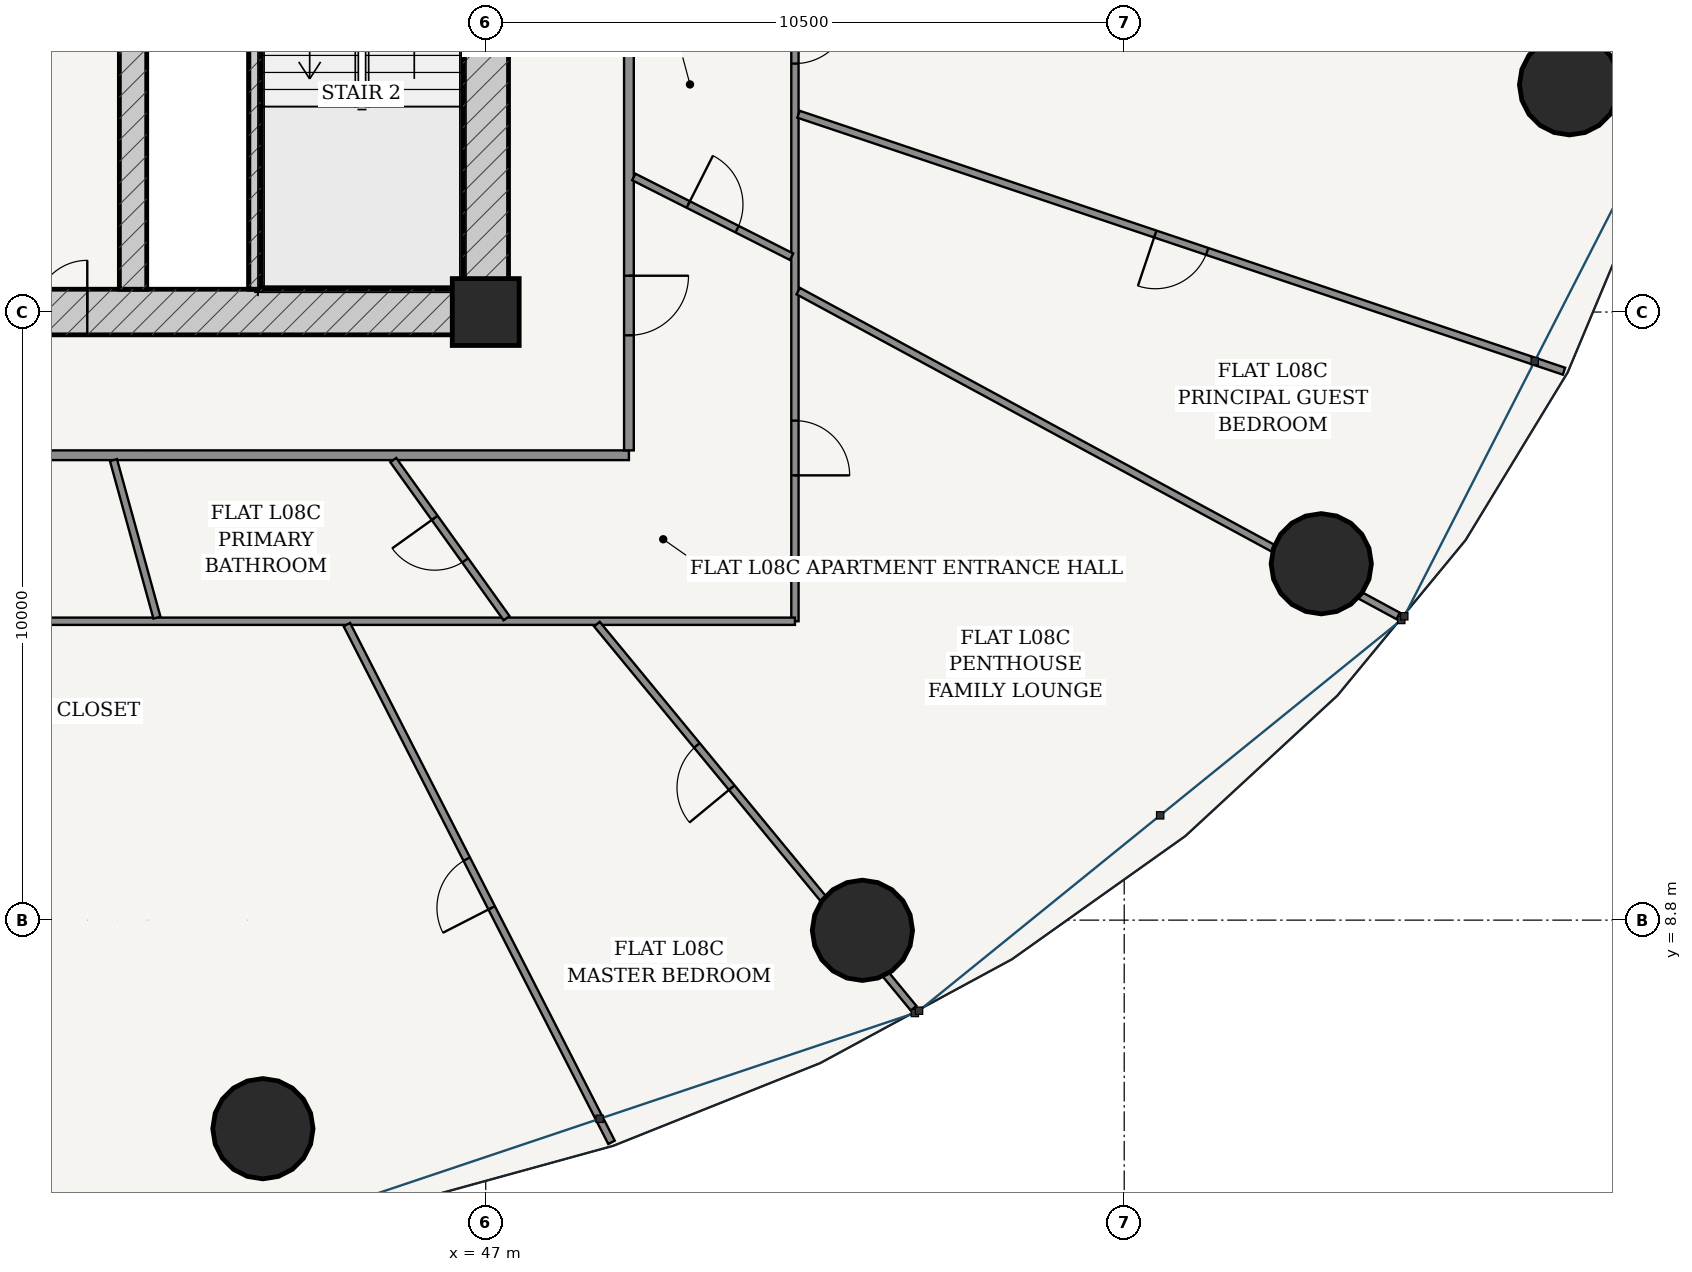
"""IFC4 building model, lengths in metres.
Left out: names, types, materials, properties, quantities, classifications, styles, units other than length and angle.
Written with IfcOpenShell. Run it as: python <this file> out.ifc"""

import sys

from ifc_helpers import new_model, si_unit, direction, frame, frame_2d, origin, origin_2d, place, context, subcontext, project, spatial, rectangle, hollow_circle, extrude, source, transform, mapped, element, fill, save


model = new_model("IFC4")
c1 = context("Model", 3, precision=1e-05, world=origin(), true_north=direction((-0.2419218956, 0.970295726276)))
c2 = subcontext(c1, "Body", "Model", "MODEL_VIEW")
j1 = project(units=[si_unit("LENGTHUNIT", "METRE"), si_unit("PLANEANGLEUNIT", "RADIAN")], contexts=[c1])
p1 = place(None, origin())
s1 = spatial("IfcSite", under=j1, at=p1, CompositionType="ELEMENT")
p2 = place(p1, origin())
s2 = spatial("IfcBuilding", under=s1, at=p2, CompositionType="ELEMENT")
p3 = place(p2, frame((0.0, 0.0, 34.8)))
s3 = spatial("IfcBuildingStorey", under=s2, at=p3, CompositionType="ELEMENT", Elevation=34.8)
p4 = place(p3, frame((47.0, 18.8, 0.0), z_axis=(0.0, 0.0, 1.0), x_axis=(1.0, 0.0, 0.0)))
e1 = element("IfcColumn", 1, at=p4, inside=s3, PredefinedType="COLUMN", context=c2, shape_type="SweptSolid", body=[
    extrude(rectangle(XDim=1.1, YDim=1.1, at=origin_2d()), origin(), (0.0, 0.0, 1.0), 3.6),
])
p5 = place(p3, frame((28.625, 18.8, 0.0), z_axis=(0.0, 0.0, 1.0), x_axis=(1.0, 0.0, 0.0)))
e2 = element("IfcWall", 2, at=p5, inside=s3, PredefinedType="SHEAR", context=c2, shape_type="SweptSolid", body=[
    extrude(rectangle(XDim=18.75, YDim=0.75, at=frame_2d((9.375, 0.0))), origin(), (0.0, 0.0, 1.0), 3.32),
])
p6 = place(p5, frame((6.927, 0.0, 0.0)))
e3 = element("IfcOpeningElement", 3, at=p6, cuts=e2, PredefinedType="OPENING", context=c2, shape_type="SweptSolid", body=[
    extrude(rectangle(XDim=0.85, YDim=2.1, at=frame_2d((0.425, 1.05))), frame((0.0, 0.385, 0.0), z_axis=(0.0, -1.0, 0.0), x_axis=(1.0, 0.0, 0.0)), (0.0, 0.0, 1.0), 0.77),
])
p7 = place(p5, frame((8.95, 0.0, 0.0)))
e4 = element("IfcOpeningElement", 4, at=p7, cuts=e2, PredefinedType="OPENING", context=c2, shape_type="SweptSolid", body=[
    extrude(rectangle(XDim=0.85, YDim=2.1, at=frame_2d((0.425, 1.05))), frame((0.0, 0.385, 0.0), z_axis=(0.0, -1.0, 0.0), x_axis=(1.0, 0.0, 0.0)), (0.0, 0.0, 1.0), 0.77),
])
p8 = place(p5, frame((10.972, 0.0, 0.0)))
e5 = element("IfcOpeningElement", 5, at=p8, cuts=e2, PredefinedType="OPENING", context=c2, shape_type="SweptSolid", body=[
    extrude(rectangle(XDim=0.85, YDim=2.1, at=frame_2d((0.425, 1.05))), frame((0.0, 0.385, 0.0), z_axis=(0.0, -1.0, 0.0), x_axis=(1.0, 0.0, 0.0)), (0.0, 0.0, 1.0), 0.77),
])
p9 = place(p3, frame((47.0, 19.175, 0.0), z_axis=(0.0, 0.0, 1.0), x_axis=(0.0, 1.0, 0.0)))
e6 = element("IfcWall", 6, at=p9, inside=s3, PredefinedType="SHEAR", context=c2, shape_type="SweptSolid", body=[
    extrude(rectangle(XDim=15.25, YDim=0.75, at=frame_2d((7.625, 0.0))), origin(), (0.0, 0.0, 1.0), 3.32),
])
p10 = place(p9, frame((9.875, 0.0, 0.0)))
e7 = element("IfcOpeningElement", 7, at=p10, cuts=e6, PredefinedType="OPENING", context=c2, shape_type="SweptSolid", body=[
    extrude(rectangle(XDim=1.5, YDim=2.2, at=frame_2d((0.75, 1.1))), frame((0.0, 0.385, 0.0), z_axis=(0.0, -1.0, 0.0), x_axis=(1.0, 0.0, 0.0)), (0.0, 0.0, 1.0), 0.77),
])
p11 = place(p3, frame((43.205, 19.175, 0.0), z_axis=(0.0, 0.0, 1.0), x_axis=(0.0, 1.0, 0.0)))
e8 = element("IfcWall", 8, at=p11, inside=s3, PredefinedType="SOLIDWALL", context=c2, shape_type="SweptSolid", body=[
    extrude(rectangle(XDim=7.375, YDim=0.2, at=frame_2d((3.688, 0.0))), origin(), (0.0, 0.0, 1.0), 3.32),
])
p12 = place(p3, frame((41.2, 19.175, 0.0), z_axis=(0.0, 0.0, 1.0), x_axis=(0.0, 1.0, 0.0)))
e9 = element("IfcWall", 9, at=p12, inside=s3, PredefinedType="SHEAR", context=c2, shape_type="SweptSolid", body=[
    extrude(rectangle(XDim=15.25, YDim=0.45, at=frame_2d((7.625, 0.0))), origin(), (0.0, 0.0, 1.0), 3.32),
])
p13 = place(p12, frame((7.8, 0.0, 0.0)))
e10 = element("IfcOpeningElement", 10, at=p13, cuts=e9, PredefinedType="OPENING", context=c2, shape_type="SweptSolid", body=[
    extrude(rectangle(XDim=1.05, YDim=2.15, at=frame_2d((0.525, 1.075))), frame((0.0, 0.235, 0.0), z_axis=(0.0, -1.0, 0.0), x_axis=(1.0, 0.0, 0.0)), (0.0, 0.0, 1.0), 0.47),
])
for number, where, z_axis, x_axis in (
    (11, (43.336, 5.37, 0.0), (0.0, 0.0, 1.0), (1.0, 0.0, 0.0)),
    (12, (53.195, 8.632, 0.0), (0.0, 0.0, 1.0), (1.0, 0.0, 0.0)),
    (13, (60.741, 14.661, 0.0), (0.0, 0.0, 1.0), (1.0, 0.0, 0.0)),
    (14, (64.824, 22.537, 0.0), (0.0, 0.0, 1.0), (1.0, 0.0, 0.0)),
):
    element("IfcColumn", number, at=place(p3, frame(where, z_axis=z_axis, x_axis=x_axis)), inside=s3, PredefinedType="COLUMN", context=c2, shape_type="SweptSolid", body=[
        extrude(hollow_circle(Radius=0.825, WallThickness=0.05, at=origin_2d()), origin(), (0.0, 0.0, 1.0), 3.6),
    ])
p14 = place(p3, frame((26.645, 16.445, 0.0), z_axis=(0.0, 0.0, 1.0), x_axis=(1.0, 0.0, 0.0)))
e15 = element("IfcWall", 15, at=p14, inside=s3, PredefinedType="PARTITIONING", context=c2, shape_type="SweptSolid", body=[
    extrude(rectangle(XDim=22.71, YDim=0.16, at=frame_2d((11.355, 0.0))), origin(), (0.0, 0.0, 1.0), 2.688),
])
p15 = place(p3, frame((49.355, 16.525, 0.0), z_axis=(0.0, 0.0, 1.0), x_axis=(0.0, 1.0, 0.0)))
e16 = element("IfcWall", 16, at=p15, inside=s3, PredefinedType="PARTITIONING", context=c2, shape_type="SweptSolid", body=[
    extrude(rectangle(XDim=20.55, YDim=0.16, at=frame_2d((10.275, 0.0))), origin(), (0.0, 0.0, 1.0), 2.688),
])
p16 = place(p15, frame((17.207, 0.0, 0.0)))
e17 = element("IfcOpeningElement", 17, at=p16, cuts=e16, PredefinedType="OPENING", context=c2, shape_type="SweptSolid", body=[
    extrude(rectangle(XDim=0.98, YDim=2.2, at=frame_2d((0.49, 1.1))), frame((0.0, 0.09, 0.0), z_axis=(0.0, -1.0, 0.0), x_axis=(1.0, 0.0, 0.0)), (0.0, 0.0, 1.0), 0.18),
])
p17 = place(p15, frame((1.892, 0.0, 0.0)))
e18 = element("IfcOpeningElement", 18, at=p17, cuts=e16, PredefinedType="OPENING", context=c2, shape_type="SweptSolid", body=[
    extrude(rectangle(XDim=0.98, YDim=2.2, at=frame_2d((0.49, 1.1))), frame((0.0, 0.09, 0.0), z_axis=(0.0, -1.0, 0.0), x_axis=(1.0, 0.0, 0.0)), (0.0, 0.0, 1.0), 0.18),
])
p18 = place(p3, frame((52.085, 28.968, 0.0), z_axis=(0.0, 0.0, 1.0), x_axis=(0.0, -1.0, 0.0)))
e19 = element("IfcWall", 19, at=p18, inside=s3, PredefinedType="PARTITIONING", context=c2, shape_type="SweptSolid", body=[
    extrude(rectangle(XDim=15.253, YDim=0.12, at=frame_2d((7.626, 0.0))), origin(), (0.0, 0.0, 1.0), 2.688),
])
p19 = place(p18, frame((11.954, 0.0, 0.0)))
e20 = element("IfcOpeningElement", 20, at=p19, cuts=e19, PredefinedType="OPENING", context=c2, shape_type="SweptSolid", body=[
    extrude(rectangle(XDim=0.9, YDim=2.15, at=frame_2d((0.45, 1.075))), frame((0.0, 0.07, 0.0), z_axis=(0.0, -1.0, 0.0), x_axis=(1.0, 0.0, 0.0)), (0.0, 0.0, 1.0), 0.14),
])
p20 = place(p18, frame((5.182, 0.0, 0.0)))
e21 = element("IfcOpeningElement", 21, at=p20, cuts=e19, PredefinedType="OPENING", context=c2, shape_type="SweptSolid", body=[
    extrude(rectangle(XDim=0.9, YDim=2.15, at=frame_2d((0.45, 1.075))), frame((0.0, 0.07, 0.0), z_axis=(0.0, -1.0, 0.0), x_axis=(1.0, 0.0, 0.0)), (0.0, 0.0, 1.0), 0.14),
])
p21 = place(p18, frame((1.889, 0.0, 0.0)))
e22 = element("IfcOpeningElement", 22, at=p21, cuts=e19, PredefinedType="OPENING", context=c2, shape_type="SweptSolid", body=[
    extrude(rectangle(XDim=0.9, YDim=2.15, at=frame_2d((0.45, 1.075))), frame((0.0, 0.07, 0.0), z_axis=(0.0, -1.0, 0.0), x_axis=(1.0, 0.0, 0.0)), (0.0, 0.0, 1.0), 0.14),
])
p22 = place(p3, frame((52.085, 13.715, 0.0), z_axis=(0.0, 0.0, 1.0), x_axis=(-1.0, 0.0, 0.0)))
e23 = element("IfcWall", 23, at=p22, inside=s3, PredefinedType="PARTITIONING", context=c2, shape_type="SweptSolid", body=[
    extrude(rectangle(XDim=24.772, YDim=0.12, at=frame_2d((12.386, 0.0))), origin(), (0.0, 0.0, 1.0), 2.688),
])
p23 = place(p22, frame((20.912, 0.0, 0.0)))
e24 = element("IfcOpeningElement", 24, at=p23, cuts=e23, PredefinedType="OPENING", context=c2, shape_type="SweptSolid", body=[
    extrude(rectangle(XDim=0.86, YDim=2.15, at=frame_2d((0.43, 1.075))), frame((0.0, 0.07, 0.0), z_axis=(0.0, -1.0, 0.0), x_axis=(1.0, 0.0, 0.0)), (0.0, 0.0, 1.0), 0.14),
])
p24 = place(p22, frame((13.87, 0.0, 0.0)))
e25 = element("IfcOpeningElement", 25, at=p24, cuts=e23, PredefinedType="OPENING", context=c2, shape_type="SweptSolid", body=[
    extrude(rectangle(XDim=0.9, YDim=2.15, at=frame_2d((0.45, 1.075))), frame((0.0, 0.07, 0.0), z_axis=(0.0, -1.0, 0.0), x_axis=(1.0, 0.0, 0.0)), (0.0, 0.0, 1.0), 0.14),
])
p25 = place(p3, frame((44.717, 13.66, 0.0), z_axis=(0.0, 0.0, 1.0), x_axis=(0.455131303234, -0.890424335256, 0.0)))
e26 = element("IfcWall", 26, at=p25, inside=s3, PredefinedType="PARTITIONING", context=c2, shape_type="SweptSolid", body=[
    extrude(rectangle(XDim=9.562, YDim=0.12, at=frame_2d((4.781, 0.0))), origin(), (0.0, 0.0, 1.0), 2.762),
])
p26 = place(p25, frame((4.331, 0.0, 0.0)))
e27 = element("IfcOpeningElement", 27, at=p26, cuts=e26, PredefinedType="OPENING", context=c2, shape_type="SweptSolid", body=[
    extrude(rectangle(XDim=0.9, YDim=2.15, at=frame_2d((0.45, 1.075))), frame((0.0, 0.07, 0.0), z_axis=(0.0, -1.0, 0.0), x_axis=(1.0, 0.0, 0.0)), (0.0, 0.0, 1.0), 0.14),
])
p27 = place(p3, frame((48.829, 13.667, 0.0), z_axis=(0.0, 0.0, 1.0), x_axis=(0.636177533893, -0.771542704826, 0.0)))
e28 = element("IfcWall", 28, at=p27, inside=s3, PredefinedType="PARTITIONING", context=c2, shape_type="SweptSolid", body=[
    extrude(rectangle(XDim=8.187, YDim=0.12, at=frame_2d((4.093, 0.0))), origin(), (0.0, 0.0, 1.0), 2.688),
])
p28 = place(p27, frame((2.584, 0.0, 0.0)))
e29 = element("IfcOpeningElement", 29, at=p28, cuts=e28, PredefinedType="OPENING", context=c2, shape_type="SweptSolid", body=[
    extrude(rectangle(XDim=0.9, YDim=2.15, at=frame_2d((0.45, 1.075))), frame((0.0, 0.07, 0.0), z_axis=(0.0, -1.0, 0.0), x_axis=(1.0, 0.0, 0.0)), (0.0, 0.0, 1.0), 0.14),
])
p29 = place(p3, frame((52.139, 19.144, 0.0), z_axis=(0.0, 0.0, 1.0), x_axis=(0.879372452045, -0.476134529922, 0.0)))
e30 = element("IfcWall", 30, at=p29, inside=s3, PredefinedType="PARTITIONING", context=c2, shape_type="SweptSolid", body=[
    extrude(rectangle(XDim=11.219, YDim=0.12, at=frame_2d((5.61, 0.0))), origin(), (0.0, 0.0, 1.0), 2.688),
])
p30 = place(p3, frame((52.144, 22.052, 0.0), z_axis=(0.0, 0.0, 1.0), x_axis=(0.948023034133, -0.318201707653, 0.0)))
e31 = element("IfcWall", 31, at=p30, inside=s3, PredefinedType="PARTITIONING", context=c2, shape_type="SweptSolid", body=[
    extrude(rectangle(XDim=13.279, YDim=0.12, at=frame_2d((6.639, 0.0))), origin(), (0.0, 0.0, 1.0), 2.762),
])
p31 = place(p30, frame((6.189, 0.0, 0.0)))
e32 = element("IfcOpeningElement", 32, at=p31, cuts=e31, PredefinedType="OPENING", context=c2, shape_type="SweptSolid", body=[
    extrude(rectangle(XDim=0.9, YDim=2.15, at=frame_2d((0.45, 1.075))), frame((0.0, 0.07, 0.0), z_axis=(0.0, -1.0, 0.0), x_axis=(1.0, 0.0, 0.0)), (0.0, 0.0, 1.0), 0.14),
])
p32 = place(p3, frame((40.878, 16.365, 0.0), z_axis=(0.0, 0.0, 1.0), x_axis=(0.265853298244, -0.964013497734, 0.0)))
e33 = element("IfcWall", 33, at=p32, inside=s3, PredefinedType="PARTITIONING", context=c2, shape_type="SweptSolid", body=[
    extrude(rectangle(XDim=2.687, YDim=0.12, at=frame_2d((1.344, 0.0))), origin(), (0.0, 0.0, 1.0), 3.32),
])
p33 = place(p3, frame((45.48, 16.365, 0.0), z_axis=(0.0, 0.0, 1.0), x_axis=(0.582566008831, -0.812783393872, 0.0)))
e34 = element("IfcWall", 34, at=p33, inside=s3, PredefinedType="PARTITIONING", context=c2, shape_type="SweptSolid", body=[
    extrude(rectangle(XDim=3.198, YDim=0.12, at=frame_2d((1.599, 0.0))), origin(), (0.0, 0.0, 1.0), 3.32),
])
p34 = place(p33, frame((1.169, 0.0, 0.0)))
e35 = element("IfcOpeningElement", 35, at=p34, cuts=e34, PredefinedType="OPENING", context=c2, shape_type="SweptSolid", body=[
    extrude(rectangle(XDim=0.86, YDim=2.15, at=frame_2d((0.43, 1.075))), frame((0.0, 0.07, 0.0), z_axis=(0.0, -1.0, 0.0), x_axis=(1.0, 0.0, 0.0)), (0.0, 0.0, 1.0), 0.14),
])
p35 = place(p3, frame((49.435, 21.021, 0.0), z_axis=(0.0, 0.0, 1.0), x_axis=(0.892504324967, -0.451038834155, 0.0)))
e36 = element("IfcWall", 36, at=p35, inside=s3, PredefinedType="PARTITIONING", context=c2, shape_type="SweptSolid", body=[
    extrude(rectangle(XDim=2.907, YDim=0.12, at=frame_2d((1.454, 0.0))), origin(), (0.0, 0.0, 1.0), 3.32),
])
p36 = place(p35, frame((1.004, 0.0, 0.0)))
e37 = element("IfcOpeningElement", 37, at=p36, cuts=e36, PredefinedType="OPENING", context=c2, shape_type="SweptSolid", body=[
    extrude(rectangle(XDim=0.9, YDim=2.15, at=frame_2d((0.45, 1.075))), frame((0.0, 0.07, 0.0), z_axis=(0.0, -1.0, 0.0), x_axis=(1.0, 0.0, 0.0)), (0.0, 0.0, 1.0), 0.14),
])
m1 = source(origin(), c2, "Body", "SweptSolid", [
    extrude(rectangle(XDim=0.85, YDim=2.1, at=frame_2d((0.425, 1.05))), frame((0.0, 0.025, 0.0), z_axis=(0.0, -1.0, 0.0), x_axis=(1.0, 0.0, 0.0)), (0.0, 0.0, 1.0), 0.05),
])
p37 = place(p8, origin())
e38 = element("IfcDoor", 38, at=p37, inside=s3, OperationType="SINGLE_SWING_RIGHT", PredefinedType="DOOR", context=c2, shape_type="MappedRepresentation", body=[
    mapped(m1, transform((0.0, 0.0, 0.0), scale=1.0)),
])
fill(e5, e38)
m2 = source(origin(), c2, "Body", "SweptSolid", [
    extrude(rectangle(XDim=0.98, YDim=2.2, at=frame_2d((0.49, 1.1))), frame((0.0, 0.025, 0.0), z_axis=(0.0, -1.0, 0.0), x_axis=(1.0, 0.0, 0.0)), (0.0, 0.0, 1.0), 0.05),
])
p38 = place(p17, frame((0.98, 0.0, 0.0), z_axis=(0.0, 0.0, 1.0), x_axis=(-1.0, 0.0, 0.0)))
e39 = element("IfcDoor", 39, at=p38, inside=s3, OperationType="SINGLE_SWING_LEFT", PredefinedType="DOOR", context=c2, shape_type="MappedRepresentation", body=[
    mapped(m2, transform((0.0, 0.0, 0.0), scale=1.0)),
])
fill(e18, e39)
m3 = source(origin(), c2, "Body", "SweptSolid", [
    extrude(rectangle(XDim=0.86, YDim=2.15, at=frame_2d((0.43, 1.075))), frame((0.0, 0.025, 0.0), z_axis=(0.0, -1.0, 0.0), x_axis=(1.0, 0.0, 0.0)), (0.0, 0.0, 1.0), 0.05),
])
p39 = place(p34, frame((0.86, 0.0, 0.0), z_axis=(0.0, 0.0, 1.0), x_axis=(-1.0, 0.0, 0.0)))
e40 = element("IfcDoor", 40, at=p39, inside=s3, OperationType="SINGLE_SWING_RIGHT", PredefinedType="DOOR", context=c2, shape_type="MappedRepresentation", body=[
    mapped(m3, transform((0.0, 0.0, 0.0), scale=1.0)),
])
fill(e35, e40)
m4 = source(origin(), c2, "Body", "SweptSolid", [
    extrude(rectangle(XDim=0.9, YDim=2.15, at=frame_2d((0.45, 1.075))), frame((0.0, 0.025, 0.0), z_axis=(0.0, -1.0, 0.0), x_axis=(1.0, 0.0, 0.0)), (0.0, 0.0, 1.0), 0.05),
])
p40 = place(p36, origin())
e41 = element("IfcDoor", 41, at=p40, inside=s3, OperationType="SINGLE_SWING_LEFT", PredefinedType="DOOR", context=c2, shape_type="MappedRepresentation", body=[
    mapped(m4, transform((0.0, 0.0, 0.0), scale=1.0)),
])
fill(e37, e41)
p41 = place(p19, origin())
e42 = element("IfcDoor", 42, at=p41, inside=s3, OperationType="SINGLE_SWING_RIGHT", PredefinedType="DOOR", context=c2, shape_type="MappedRepresentation", body=[
    mapped(m4, transform((0.0, 0.0, 0.0), scale=1.0)),
])
fill(e20, e42)
p42 = place(p20, origin())
e43 = element("IfcDoor", 43, at=p42, inside=s3, OperationType="SINGLE_SWING_LEFT", PredefinedType="DOOR", context=c2, shape_type="MappedRepresentation", body=[
    mapped(m4, transform((0.0, 0.0, 0.0), scale=1.0)),
])
fill(e21, e43)
p43 = place(p28, frame((0.9, 0.0, 0.0), z_axis=(0.0, 0.0, 1.0), x_axis=(-1.0, 0.0, 0.0)))
e44 = element("IfcDoor", 44, at=p43, inside=s3, OperationType="SINGLE_SWING_LEFT", PredefinedType="DOOR", context=c2, shape_type="MappedRepresentation", body=[
    mapped(m4, transform((0.0, 0.0, 0.0), scale=1.0)),
])
fill(e29, e44)
p44 = place(p31, frame((0.9, 0.0, 0.0), z_axis=(0.0, 0.0, 1.0), x_axis=(-1.0, 0.0, 0.0)))
e45 = element("IfcDoor", 45, at=p44, inside=s3, OperationType="SINGLE_SWING_RIGHT", PredefinedType="DOOR", context=c2, shape_type="MappedRepresentation", body=[
    mapped(m4, transform((0.0, 0.0, 0.0), scale=1.0)),
])
fill(e32, e45)
p45 = place(p26, frame((0.9, 0.0, 0.0), z_axis=(0.0, 0.0, 1.0), x_axis=(-1.0, 0.0, 0.0)))
e46 = element("IfcDoor", 46, at=p45, inside=s3, OperationType="SINGLE_SWING_LEFT", PredefinedType="DOOR", context=c2, shape_type="MappedRepresentation", body=[
    mapped(m4, transform((0.0, 0.0, 0.0), scale=1.0)),
])
fill(e27, e46)
save(model, sys.argv[1])
